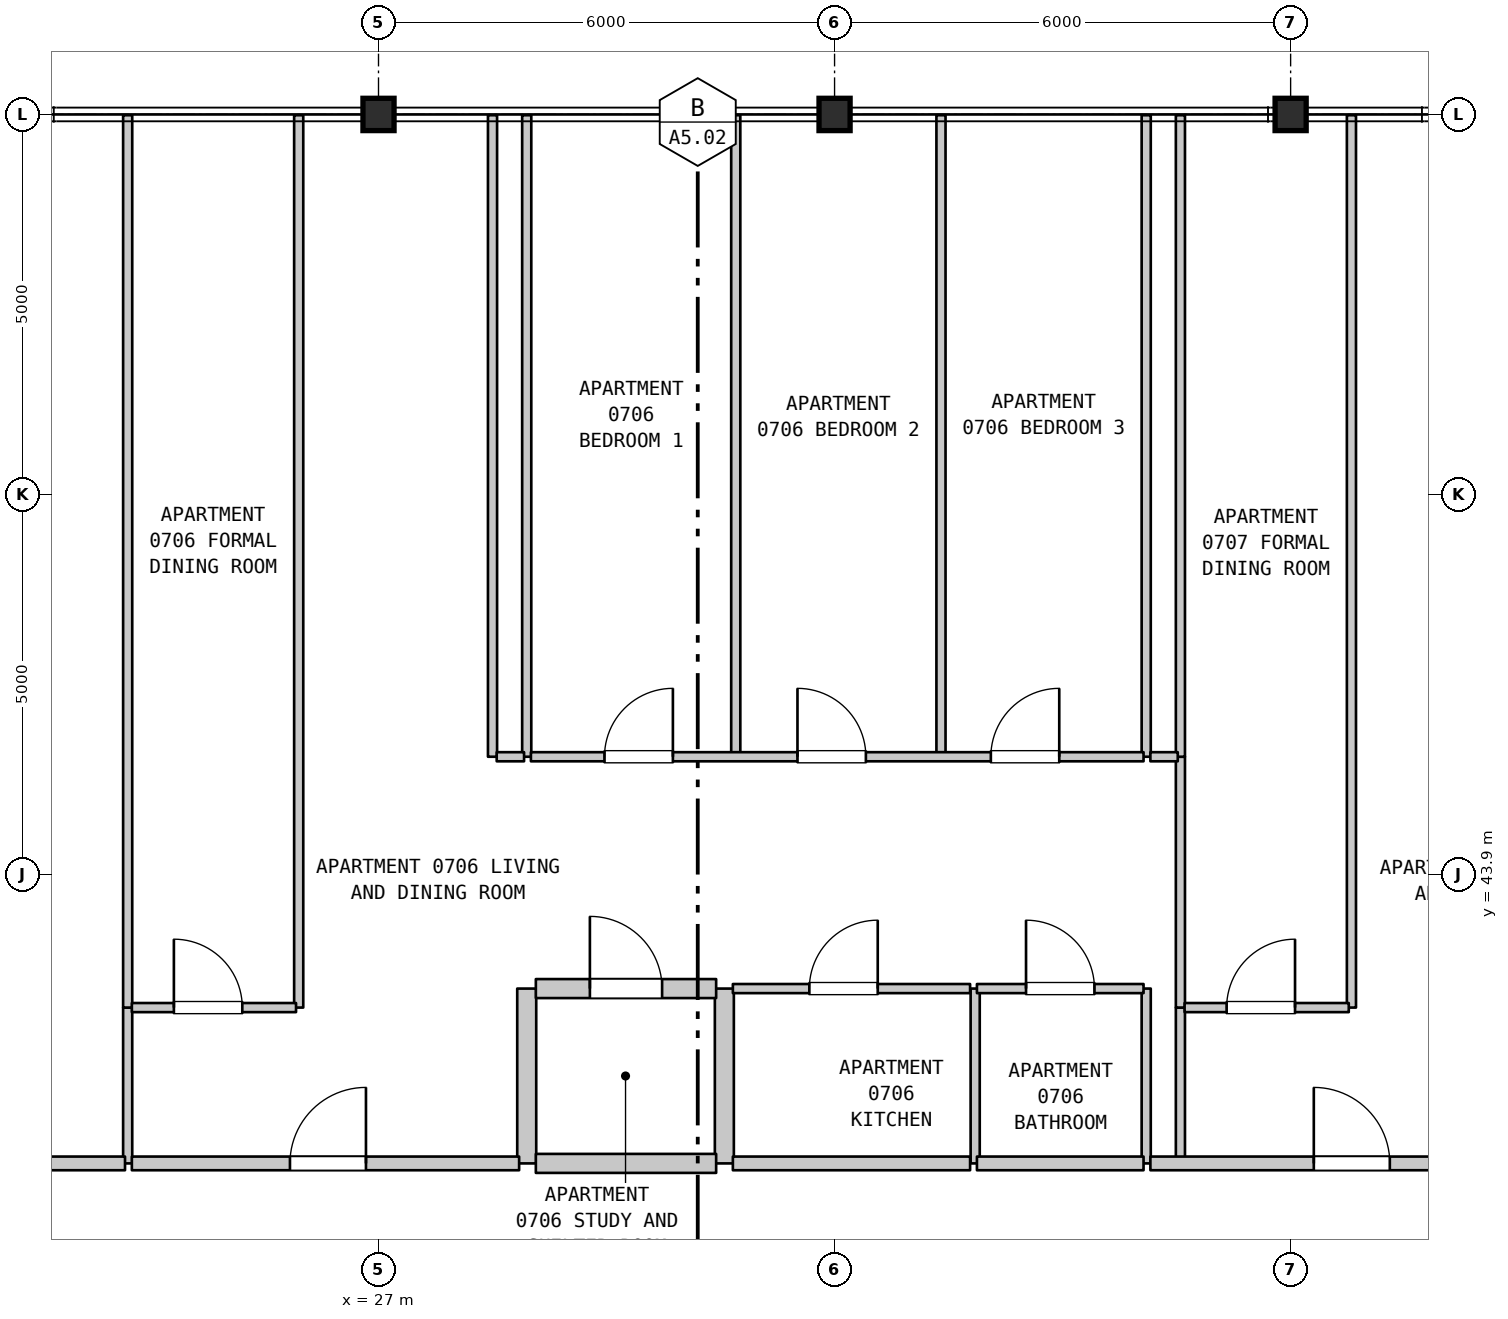
"""IFC4 building model, lengths in metres.
Left out: names, types, materials, properties, quantities, classifications, styles, units other than length and angle.
Written with IfcOpenShell. Run it as: python <this file> out.ifc"""

import sys

from ifc_helpers import new_model, si_unit, direction, frame, frame_2d, origin, origin_2d, place, context, subcontext, project, spatial, rectangle, i_section, extrude, element, fill, save


model = new_model("IFC4")
c1 = context("Model", 3, precision=1e-05, world=origin(), true_north=direction((0.0, 1.0)))
c2 = subcontext(c1, "Body", "Model", "MODEL_VIEW")
j1 = project(units=[si_unit("LENGTHUNIT", "METRE"), si_unit("PLANEANGLEUNIT", "RADIAN")], contexts=[c1])
p1 = place(None, origin())
s1 = spatial("IfcSite", under=j1, at=p1, CompositionType="ELEMENT")
p2 = place(p1, origin())
s2 = spatial("IfcBuilding", under=s1, at=p2, CompositionType="ELEMENT")
p3 = place(p2, frame((0.0, 0.0, 35.1)))
s3 = spatial("IfcBuildingStorey", under=s2, at=p3, CompositionType="ELEMENT", Elevation=35.1)
for number, where, z_axis, x_axis in (
    (1, (27.0, 53.9, 0.0), (0.0, 0.0, 1.0), (1.0, 0.0, 0.0)),
    (2, (33.0, 53.9, 0.0), (0.0, 0.0, 1.0), (1.0, 0.0, 0.0)),
    (3, (39.0, 53.9, 0.0), (0.0, 0.0, 1.0), (1.0, 0.0, 0.0)),
):
    element("IfcColumn", number, at=place(p3, frame(where, z_axis=z_axis, x_axis=x_axis)), inside=s3, PredefinedType="COLUMN", context=c2, shape_type="SweptSolid", body=[
        extrude(i_section(OverallWidth=0.409, OverallDepth=0.425, WebThickness=0.032, FlangeThickness=0.052, FilletRadius=0.015, at=origin_2d()), origin(), (0.0, 0.0, 1.0), 3.7),
    ])
p4 = place(p3, frame((23.7, 40.1, 0.0), z_axis=(0.0, 0.0, 1.0), x_axis=(0.0, 1.0, 0.0)))
e4 = element("IfcWall", 4, at=p4, inside=s3, PredefinedType="PARTITIONING", context=c2, shape_type="SweptSolid", body=[
    extrude(rectangle(XDim=2.05, YDim=0.12, at=frame_2d((1.025, 0.0))), origin(), (0.0, 0.0, 1.0), 3.385),
])
for number, where, z_axis, x_axis in (
    (5, (23.7, 42.15, 0.0), (0.0, 0.0, 1.0), (0.0, 1.0, 0.0)),
    (6, (25.95, 42.15, 0.0), (0.0, 0.0, 1.0), (0.0, 1.0, 0.0)),
):
    element("IfcWall", number, at=place(p3, frame(where, z_axis=z_axis, x_axis=x_axis)), inside=s3, PredefinedType="PARTITIONING", context=c2, shape_type="SweptSolid", body=[
        extrude(rectangle(XDim=11.74, YDim=0.12, at=frame_2d((5.87, 0.0))), origin(), (0.0, 0.0, 1.0), 3.385),
    ])
p5 = place(p3, frame((28.5, 45.45, 0.0), z_axis=(0.0, 0.0, 1.0), x_axis=(0.0, 1.0, 0.0)))
e7 = element("IfcWall", 7, at=p5, inside=s3, PredefinedType="PARTITIONING", context=c2, shape_type="SweptSolid", body=[
    extrude(rectangle(XDim=8.44, YDim=0.12, at=frame_2d((4.22, 0.0))), origin(), (0.0, 0.0, 1.0), 3.385),
])
p6 = place(p3, frame((28.95, 40.1, 0.0), z_axis=(0.0, 0.0, 1.0), x_axis=(0.0, 1.0, 0.0)))
e8 = element("IfcWall", 8, at=p6, inside=s3, PredefinedType="STANDARD", context=c2, shape_type="SweptSolid", body=[
    extrude(rectangle(XDim=2.3, YDim=0.25, at=frame_2d((1.15, 0.0))), origin(), (0.0, 0.0, 1.0), 3.385),
])
p7 = place(p3, frame((28.95, 45.45, 0.0), z_axis=(0.0, 0.0, 1.0), x_axis=(0.0, 1.0, 0.0)))
e9 = element("IfcWall", 9, at=p7, inside=s3, PredefinedType="PARTITIONING", context=c2, shape_type="SweptSolid", body=[
    extrude(rectangle(XDim=8.44, YDim=0.12, at=frame_2d((4.22, 0.0))), origin(), (0.0, 0.0, 1.0), 3.385),
])
p8 = place(p3, frame((31.55, 40.1, 0.0), z_axis=(0.0, 0.0, 1.0), x_axis=(0.0, 1.0, 0.0)))
e10 = element("IfcWall", 10, at=p8, inside=s3, PredefinedType="STANDARD", context=c2, shape_type="SweptSolid", body=[
    extrude(rectangle(XDim=2.3, YDim=0.25, at=frame_2d((1.15, 0.0))), origin(), (0.0, 0.0, 1.0), 3.385),
])
for number, where, z_axis, x_axis in (
    (11, (31.7, 45.45, 0.0), (0.0, 0.0, 1.0), (0.0, 1.0, 0.0)),
    (12, (34.4, 45.45, 0.0), (0.0, 0.0, 1.0), (0.0, 1.0, 0.0)),
):
    element("IfcWall", number, at=place(p3, frame(where, z_axis=z_axis, x_axis=x_axis)), inside=s3, PredefinedType="PARTITIONING", context=c2, shape_type="SweptSolid", body=[
        extrude(rectangle(XDim=8.44, YDim=0.12, at=frame_2d((4.22, 0.0))), origin(), (0.0, 0.0, 1.0), 3.385),
    ])
for number, where, z_axis, x_axis in (
    (13, (34.85, 40.1, 0.0), (0.0, 0.0, 1.0), (0.0, 1.0, 0.0)),
    (14, (37.1, 40.1, 0.0), (0.0, 0.0, 1.0), (0.0, 1.0, 0.0)),
):
    element("IfcWall", number, at=place(p3, frame(where, z_axis=z_axis, x_axis=x_axis)), inside=s3, PredefinedType="PARTITIONING", context=c2, shape_type="SweptSolid", body=[
        extrude(rectangle(XDim=2.3, YDim=0.12, at=frame_2d((1.15, 0.0))), origin(), (0.0, 0.0, 1.0), 3.385),
    ])
p9 = place(p3, frame((37.1, 45.45, 0.0), z_axis=(0.0, 0.0, 1.0), x_axis=(0.0, 1.0, 0.0)))
e15 = element("IfcWall", 15, at=p9, inside=s3, PredefinedType="PARTITIONING", context=c2, shape_type="SweptSolid", body=[
    extrude(rectangle(XDim=8.44, YDim=0.12, at=frame_2d((4.22, 0.0))), origin(), (0.0, 0.0, 1.0), 3.385),
])
p10 = place(p3, frame((37.55, 40.1, 0.0), z_axis=(0.0, 0.0, 1.0), x_axis=(0.0, 1.0, 0.0)))
e16 = element("IfcWall", 16, at=p10, inside=s3, PredefinedType="PARTITIONING", context=c2, shape_type="SweptSolid", body=[
    extrude(rectangle(XDim=2.05, YDim=0.12, at=frame_2d((1.025, 0.0))), origin(), (0.0, 0.0, 1.0), 3.385),
])
p11 = place(p3, frame((37.55, 42.15, 0.0), z_axis=(0.0, 0.0, 1.0), x_axis=(0.0, 1.0, 0.0)))
e17 = element("IfcWall", 17, at=p11, inside=s3, PredefinedType="PARTITIONING", context=c2, shape_type="SweptSolid", body=[
    extrude(rectangle(XDim=3.3, YDim=0.12, at=frame_2d((1.65, 0.0))), origin(), (0.0, 0.0, 1.0), 3.385),
])
p12 = place(p3, frame((37.55, 45.45, 0.0), z_axis=(0.0, 0.0, 1.0), x_axis=(0.0, 1.0, 0.0)))
e18 = element("IfcWall", 18, at=p12, inside=s3, PredefinedType="PARTITIONING", context=c2, shape_type="SweptSolid", body=[
    extrude(rectangle(XDim=8.44, YDim=0.12, at=frame_2d((4.22, 0.0))), origin(), (0.0, 0.0, 1.0), 3.385),
])
p13 = place(p3, frame((39.8, 42.15, 0.0), z_axis=(0.0, 0.0, 1.0), x_axis=(0.0, 1.0, 0.0)))
e19 = element("IfcWall", 19, at=p13, inside=s3, PredefinedType="PARTITIONING", context=c2, shape_type="SweptSolid", body=[
    extrude(rectangle(XDim=11.74, YDim=0.12, at=frame_2d((5.87, 0.0))), origin(), (0.0, 0.0, 1.0), 3.385),
])
p14 = place(p3, frame((21.255, 40.1, 0.0), z_axis=(0.0, 0.0, 1.0), x_axis=(1.0, 0.0, 0.0)))
e20 = element("IfcWall", 20, at=p14, inside=s3, PredefinedType="STANDARD", context=c2, shape_type="SweptSolid", body=[
    extrude(rectangle(XDim=2.41, YDim=0.18, at=frame_2d((1.205, 0.0))), origin(), (0.0, 0.0, 1.0), 3.385),
])
p15 = place(p3, frame((23.755, 40.1, 0.0), z_axis=(0.0, 0.0, 1.0), x_axis=(1.0, 0.0, 0.0)))
e21 = element("IfcWall", 21, at=p15, inside=s3, PredefinedType="STANDARD", context=c2, shape_type="SweptSolid", body=[
    extrude(rectangle(XDim=5.095, YDim=0.18, at=frame_2d((2.548, 0.0))), origin(), (0.0, 0.0, 1.0), 3.385),
])
p16 = place(p15, frame((2.08, 0.0, 0.0)))
e22 = element("IfcOpeningElement", 22, at=p16, cuts=e21, PredefinedType="OPENING", context=c2, shape_type="SweptSolid", body=[
    extrude(rectangle(XDim=1.0, YDim=2.15, at=frame_2d((0.5, 1.075))), frame((0.0, 0.1, 0.0), z_axis=(0.0, -1.0, 0.0), x_axis=(1.0, 0.0, 0.0)), (0.0, 0.0, 1.0), 0.2),
])
p17 = place(p3, frame((29.07, 40.1, 0.0), z_axis=(0.0, 0.0, 1.0), x_axis=(1.0, 0.0, 0.0)))
e23 = element("IfcWall", 23, at=p17, inside=s3, PredefinedType="STANDARD", context=c2, shape_type="SweptSolid", body=[
    extrude(rectangle(XDim=2.372, YDim=0.25, at=frame_2d((1.186, 0.0))), origin(), (0.0, 0.0, 1.0), 3.385),
])
p18 = place(p3, frame((31.662, 40.1, 0.0), z_axis=(0.0, 0.0, 1.0), x_axis=(1.0, 0.0, 0.0)))
e24 = element("IfcWall", 24, at=p18, inside=s3, PredefinedType="STANDARD", context=c2, shape_type="SweptSolid", body=[
    extrude(rectangle(XDim=3.121, YDim=0.18, at=frame_2d((1.561, 0.0))), origin(), (0.0, 0.0, 1.0), 3.385),
])
p19 = place(p3, frame((34.873, 40.1, 0.0), z_axis=(0.0, 0.0, 1.0), x_axis=(1.0, 0.0, 0.0)))
e25 = element("IfcWall", 25, at=p19, inside=s3, PredefinedType="STANDARD", context=c2, shape_type="SweptSolid", body=[
    extrude(rectangle(XDim=2.192, YDim=0.18, at=frame_2d((1.096, 0.0))), origin(), (0.0, 0.0, 1.0), 3.385),
])
p20 = place(p3, frame((37.155, 40.1, 0.0), z_axis=(0.0, 0.0, 1.0), x_axis=(1.0, 0.0, 0.0)))
e26 = element("IfcWall", 26, at=p20, inside=s3, PredefinedType="STANDARD", context=c2, shape_type="SweptSolid", body=[
    extrude(rectangle(XDim=5.3, YDim=0.18, at=frame_2d((2.65, 0.0))), origin(), (0.0, 0.0, 1.0), 3.385),
])
p21 = place(p20, frame((2.15, 0.0, 0.0)))
e27 = element("IfcOpeningElement", 27, at=p21, cuts=e26, PredefinedType="OPENING", context=c2, shape_type="SweptSolid", body=[
    extrude(rectangle(XDim=1.0, YDim=2.15, at=frame_2d((0.5, 1.075))), frame((0.0, 0.1, 0.0), z_axis=(0.0, -1.0, 0.0), x_axis=(1.0, 0.0, 0.0)), (0.0, 0.0, 1.0), 0.2),
])
p22 = place(p3, frame((23.755, 42.15, 0.0), z_axis=(0.0, 0.0, 1.0), x_axis=(1.0, 0.0, 0.0)))
e28 = element("IfcWall", 28, at=p22, inside=s3, PredefinedType="PARTITIONING", context=c2, shape_type="SweptSolid", body=[
    extrude(rectangle(XDim=2.16, YDim=0.12, at=frame_2d((1.08, 0.0))), origin(), (0.0, 0.0, 1.0), 3.385),
])
p23 = place(p22, frame((0.553, 0.0, 0.0)))
e29 = element("IfcOpeningElement", 29, at=p23, cuts=e28, PredefinedType="OPENING", context=c2, shape_type="SweptSolid", body=[
    extrude(rectangle(XDim=0.9, YDim=2.15, at=frame_2d((0.45, 1.075))), frame((0.0, 0.07, 0.0), z_axis=(0.0, -1.0, 0.0), x_axis=(1.0, 0.0, 0.0)), (0.0, 0.0, 1.0), 0.14),
])
p24 = place(p3, frame((37.605, 42.15, 0.0), z_axis=(0.0, 0.0, 1.0), x_axis=(1.0, 0.0, 0.0)))
e30 = element("IfcWall", 30, at=p24, inside=s3, PredefinedType="PARTITIONING", context=c2, shape_type="SweptSolid", body=[
    extrude(rectangle(XDim=2.16, YDim=0.12, at=frame_2d((1.08, 0.0))), origin(), (0.0, 0.0, 1.0), 3.385),
])
p25 = place(p24, frame((0.553, 0.0, 0.0)))
e31 = element("IfcOpeningElement", 31, at=p25, cuts=e30, PredefinedType="OPENING", context=c2, shape_type="SweptSolid", body=[
    extrude(rectangle(XDim=0.9, YDim=2.15, at=frame_2d((0.45, 1.075))), frame((0.0, 0.07, 0.0), z_axis=(0.0, -1.0, 0.0), x_axis=(1.0, 0.0, 0.0)), (0.0, 0.0, 1.0), 0.14),
])
p26 = place(p3, frame((29.07, 42.4, 0.0), z_axis=(0.0, 0.0, 1.0), x_axis=(1.0, 0.0, 0.0)))
e32 = element("IfcWall", 32, at=p26, inside=s3, PredefinedType="STANDARD", context=c2, shape_type="SweptSolid", body=[
    extrude(rectangle(XDim=2.372, YDim=0.25, at=frame_2d((1.186, 0.0))), origin(), (0.0, 0.0, 1.0), 3.385),
])
p27 = place(p26, frame((0.711, 0.0, 0.0)))
e33 = element("IfcOpeningElement", 33, at=p27, cuts=e32, PredefinedType="OPENING", context=c2, shape_type="SweptSolid", body=[
    extrude(rectangle(XDim=0.95, YDim=2.15, at=frame_2d((0.475, 1.075))), frame((0.0, 0.135, 0.0), z_axis=(0.0, -1.0, 0.0), x_axis=(1.0, 0.0, 0.0)), (0.0, 0.0, 1.0), 0.27),
])
p28 = place(p3, frame((31.662, 42.4, 0.0), z_axis=(0.0, 0.0, 1.0), x_axis=(1.0, 0.0, 0.0)))
e34 = element("IfcWall", 34, at=p28, inside=s3, PredefinedType="PARTITIONING", context=c2, shape_type="SweptSolid", body=[
    extrude(rectangle(XDim=3.121, YDim=0.12, at=frame_2d((1.561, 0.0))), origin(), (0.0, 0.0, 1.0), 3.385),
])
p29 = place(p28, frame((1.006, 0.0, 0.0)))
e35 = element("IfcOpeningElement", 35, at=p29, cuts=e34, PredefinedType="OPENING", context=c2, shape_type="SweptSolid", body=[
    extrude(rectangle(XDim=0.9, YDim=2.15, at=frame_2d((0.45, 1.075))), frame((0.0, 0.07, 0.0), z_axis=(0.0, -1.0, 0.0), x_axis=(1.0, 0.0, 0.0)), (0.0, 0.0, 1.0), 0.14),
])
p30 = place(p3, frame((34.873, 42.4, 0.0), z_axis=(0.0, 0.0, 1.0), x_axis=(1.0, 0.0, 0.0)))
e36 = element("IfcWall", 36, at=p30, inside=s3, PredefinedType="PARTITIONING", context=c2, shape_type="SweptSolid", body=[
    extrude(rectangle(XDim=2.192, YDim=0.12, at=frame_2d((1.096, 0.0))), origin(), (0.0, 0.0, 1.0), 3.385),
])
p31 = place(p30, frame((0.646, 0.0, 0.0)))
e37 = element("IfcOpeningElement", 37, at=p31, cuts=e36, PredefinedType="OPENING", context=c2, shape_type="SweptSolid", body=[
    extrude(rectangle(XDim=0.9, YDim=2.1, at=frame_2d((0.45, 1.05))), frame((0.0, 0.07, 0.0), z_axis=(0.0, -1.0, 0.0), x_axis=(1.0, 0.0, 0.0)), (0.0, 0.0, 1.0), 0.14),
])
p32 = place(p3, frame((28.555, 45.45, 0.0), z_axis=(0.0, 0.0, 1.0), x_axis=(1.0, 0.0, 0.0)))
e38 = element("IfcWall", 38, at=p32, inside=s3, PredefinedType="PARTITIONING", context=c2, shape_type="SweptSolid", body=[
    extrude(rectangle(XDim=0.36, YDim=0.12, at=frame_2d((0.18, 0.0))), origin(), (0.0, 0.0, 1.0), 3.385),
])
p33 = place(p3, frame((29.005, 45.45, 0.0), z_axis=(0.0, 0.0, 1.0), x_axis=(1.0, 0.0, 0.0)))
e39 = element("IfcWall", 39, at=p33, inside=s3, PredefinedType="PARTITIONING", context=c2, shape_type="SweptSolid", body=[
    extrude(rectangle(XDim=8.06, YDim=0.12, at=frame_2d((4.03, 0.0))), origin(), (0.0, 0.0, 1.0), 3.385),
])
p34 = place(p33, frame((0.968, 0.0, 0.0)))
e40 = element("IfcOpeningElement", 40, at=p34, cuts=e39, PredefinedType="OPENING", context=c2, shape_type="SweptSolid", body=[
    extrude(rectangle(XDim=0.9, YDim=2.15, at=frame_2d((0.45, 1.075))), frame((0.0, 0.07, 0.0), z_axis=(0.0, -1.0, 0.0), x_axis=(1.0, 0.0, 0.0)), (0.0, 0.0, 1.0), 0.14),
])
p35 = place(p33, frame((3.507, 0.0, 0.0)))
e41 = element("IfcOpeningElement", 41, at=p35, cuts=e39, PredefinedType="OPENING", context=c2, shape_type="SweptSolid", body=[
    extrude(rectangle(XDim=0.9, YDim=2.15, at=frame_2d((0.45, 1.075))), frame((0.0, 0.07, 0.0), z_axis=(0.0, -1.0, 0.0), x_axis=(1.0, 0.0, 0.0)), (0.0, 0.0, 1.0), 0.14),
])
p36 = place(p33, frame((6.051, 0.0, 0.0)))
e42 = element("IfcOpeningElement", 42, at=p36, cuts=e39, PredefinedType="OPENING", context=c2, shape_type="SweptSolid", body=[
    extrude(rectangle(XDim=0.9, YDim=2.15, at=frame_2d((0.45, 1.075))), frame((0.0, 0.07, 0.0), z_axis=(0.0, -1.0, 0.0), x_axis=(1.0, 0.0, 0.0)), (0.0, 0.0, 1.0), 0.14),
])
p37 = place(p3, frame((37.155, 45.45, 0.0), z_axis=(0.0, 0.0, 1.0), x_axis=(1.0, 0.0, 0.0)))
e43 = element("IfcWall", 43, at=p37, inside=s3, PredefinedType="PARTITIONING", context=c2, shape_type="SweptSolid", body=[
    extrude(rectangle(XDim=0.36, YDim=0.12, at=frame_2d((0.18, 0.0))), origin(), (0.0, 0.0, 1.0), 3.385),
])
p38 = place(p16, origin())
e44 = element("IfcDoor", 44, at=p38, inside=s3, OperationType="SINGLE_SWING_RIGHT", PredefinedType="DOOR", context=c2, shape_type="SweptSolid", body=[
    extrude(rectangle(XDim=1.0, YDim=2.15, at=frame_2d((0.5, 1.075))), frame((0.0, 0.025, 0.0), z_axis=(0.0, -1.0, 0.0), x_axis=(1.0, 0.0, 0.0)), (0.0, 0.0, 1.0), 0.05),
])
fill(e22, e44)
p39 = place(p21, origin())
e45 = element("IfcDoor", 45, at=p39, inside=s3, OperationType="SINGLE_SWING_LEFT", PredefinedType="DOOR", context=c2, shape_type="SweptSolid", body=[
    extrude(rectangle(XDim=1.0, YDim=2.15, at=frame_2d((0.5, 1.075))), frame((0.0, 0.025, 0.0), z_axis=(0.0, -1.0, 0.0), x_axis=(1.0, 0.0, 0.0)), (0.0, 0.0, 1.0), 0.05),
])
fill(e27, e45)
p40 = place(p23, origin())
e46 = element("IfcDoor", 46, at=p40, inside=s3, OperationType="SINGLE_SWING_LEFT", PredefinedType="DOOR", context=c2, shape_type="SweptSolid", body=[
    extrude(rectangle(XDim=0.9, YDim=2.15, at=frame_2d((0.45, 1.075))), frame((0.0, 0.025, 0.0), z_axis=(0.0, -1.0, 0.0), x_axis=(1.0, 0.0, 0.0)), (0.0, 0.0, 1.0), 0.05),
])
fill(e29, e46)
p41 = place(p25, origin())
e47 = element("IfcDoor", 47, at=p41, inside=s3, OperationType="SINGLE_SWING_RIGHT", PredefinedType="DOOR", context=c2, shape_type="SweptSolid", body=[
    extrude(rectangle(XDim=0.9, YDim=2.15, at=frame_2d((0.45, 1.075))), frame((0.0, 0.025, 0.0), z_axis=(0.0, -1.0, 0.0), x_axis=(1.0, 0.0, 0.0)), (0.0, 0.0, 1.0), 0.05),
])
fill(e31, e47)
p42 = place(p27, origin())
e48 = element("IfcDoor", 48, at=p42, inside=s3, OperationType="SINGLE_SWING_LEFT", PredefinedType="DOOR", context=c2, shape_type="SweptSolid", body=[
    extrude(rectangle(XDim=0.95, YDim=2.15, at=frame_2d((0.475, 1.075))), frame((0.0, 0.025, 0.0), z_axis=(0.0, -1.0, 0.0), x_axis=(1.0, 0.0, 0.0)), (0.0, 0.0, 1.0), 0.05),
])
fill(e33, e48)
p43 = place(p29, origin())
e49 = element("IfcDoor", 49, at=p43, inside=s3, OperationType="SINGLE_SWING_RIGHT", PredefinedType="DOOR", context=c2, shape_type="SweptSolid", body=[
    extrude(rectangle(XDim=0.9, YDim=2.15, at=frame_2d((0.45, 1.075))), frame((0.0, 0.025, 0.0), z_axis=(0.0, -1.0, 0.0), x_axis=(1.0, 0.0, 0.0)), (0.0, 0.0, 1.0), 0.05),
])
fill(e35, e49)
p44 = place(p31, origin())
e50 = element("IfcDoor", 50, at=p44, inside=s3, OperationType="SINGLE_SWING_LEFT", PredefinedType="DOOR", context=c2, shape_type="SweptSolid", body=[
    extrude(rectangle(XDim=0.9, YDim=2.1, at=frame_2d((0.45, 1.05))), frame((0.0, 0.025, 0.0), z_axis=(0.0, -1.0, 0.0), x_axis=(1.0, 0.0, 0.0)), (0.0, 0.0, 1.0), 0.05),
])
fill(e37, e50)
p45 = place(p34, origin())
e51 = element("IfcDoor", 51, at=p45, inside=s3, OperationType="SINGLE_SWING_RIGHT", PredefinedType="DOOR", context=c2, shape_type="SweptSolid", body=[
    extrude(rectangle(XDim=0.9, YDim=2.15, at=frame_2d((0.45, 1.075))), frame((0.0, 0.025, 0.0), z_axis=(0.0, -1.0, 0.0), x_axis=(1.0, 0.0, 0.0)), (0.0, 0.0, 1.0), 0.05),
])
fill(e40, e51)
p46 = place(p35, origin())
e52 = element("IfcDoor", 52, at=p46, inside=s3, OperationType="SINGLE_SWING_LEFT", PredefinedType="DOOR", context=c2, shape_type="SweptSolid", body=[
    extrude(rectangle(XDim=0.9, YDim=2.15, at=frame_2d((0.45, 1.075))), frame((0.0, 0.025, 0.0), z_axis=(0.0, -1.0, 0.0), x_axis=(1.0, 0.0, 0.0)), (0.0, 0.0, 1.0), 0.05),
])
fill(e41, e52)
p47 = place(p36, origin())
e53 = element("IfcDoor", 53, at=p47, inside=s3, OperationType="SINGLE_SWING_RIGHT", PredefinedType="DOOR", context=c2, shape_type="SweptSolid", body=[
    extrude(rectangle(XDim=0.9, YDim=2.15, at=frame_2d((0.45, 1.075))), frame((0.0, 0.025, 0.0), z_axis=(0.0, -1.0, 0.0), x_axis=(1.0, 0.0, 0.0)), (0.0, 0.0, 1.0), 0.05),
])
fill(e42, e53)
save(model, sys.argv[1])
